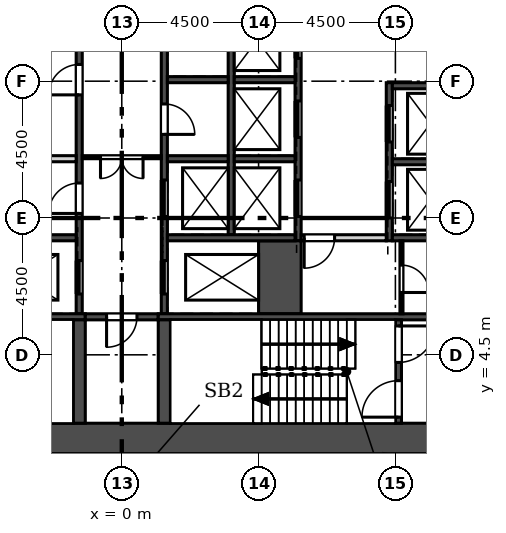
"""IFC4 building model, lengths in metres.
Left out: names, types, materials, properties, quantities, classifications, styles, units other than length and angle.
Written with IfcOpenShell. Run it as: python <this file> out.ifc"""

import sys

from ifc_helpers import new_model, si_unit, direction, frame, frame_2d, origin, place, context, subcontext, project, spatial, rectangle, extrude, element, fill, save


model = new_model("IFC4")
c1 = context("Model", 3, precision=1e-05, world=origin(), true_north=direction((0.0, 1.0)))
c2 = subcontext(c1, "Body", "Model", "MODEL_VIEW")
j1 = project(units=[si_unit("LENGTHUNIT", "METRE"), si_unit("PLANEANGLEUNIT", "RADIAN")], contexts=[c1])
p1 = place(None, origin())
s1 = spatial("IfcSite", under=j1, at=p1, CompositionType="ELEMENT")
p2 = place(p1, origin())
s2 = spatial("IfcBuilding", under=s1, at=p2, CompositionType="ELEMENT")
p3 = place(p2, frame((0.0, 0.0, 259.5)))
s3 = spatial("IfcBuildingStorey", under=s2, at=p3, CompositionType="ELEMENT", Elevation=259.5)
p4 = place(p3, frame((-13.6, 1.75, 0.0), z_axis=(0.0, 0.0, 1.0), x_axis=(1.0, 0.0, 0.0)))
e1 = element("IfcWall", 1, at=p4, inside=s3, PredefinedType="SHEAR", context=c2, shape_type="SweptSolid", body=[
    extrude(rectangle(XDim=27.2, YDim=1.0, at=frame_2d((13.6, 0.0))), origin(), (0.0, 0.0, 1.0), 7.2),
])
p5 = place(p3, frame((13.167, 10.695, 0.0), z_axis=(0.0, 0.0, 1.0), x_axis=(-0.499995021168, 0.866028278295, 0.0)))
e2 = element("IfcWall", 2, at=p5, inside=s3, PredefinedType="SHEAR", context=c2, shape_type="SweptSolid", body=[
    extrude(rectangle(XDim=8.839, YDim=1.0, at=frame_2d((4.419, 0.0))), origin(), (0.0, 0.0, 1.0), 7.2),
])
p6 = place(p3, frame((26.022, 7.709, 0.0), z_axis=(0.0, 0.0, 1.0), x_axis=(-0.500000891752, 0.866024888931, 0.0)))
e3 = element("IfcWall", 3, at=p6, inside=s3, PredefinedType="SOLIDWALL", context=c2, shape_type="SweptSolid", body=[
    extrude(rectangle(XDim=43.339, YDim=0.34, at=frame_2d((21.669, 0.0))), origin(), (0.0, 0.0, 1.0), 6.8),
])
p7 = place(p6, frame((19.335, 0.0, 0.9)))
e4 = element("IfcOpeningElement", 4, at=p7, cuts=e3, PredefinedType="OPENING", context=c2, shape_type="SweptSolid", body=[
    extrude(rectangle(XDim=1.885, YDim=3.0, at=frame_2d((0.942, 1.5))), frame((0.0, 0.18, 0.0), z_axis=(0.0, -1.0, 0.0), x_axis=(1.0, 0.0, 0.0)), (0.0, 0.0, 1.0), 0.36),
])
p8 = place(p6, frame((34.335, 0.0, 0.9)))
e5 = element("IfcOpeningElement", 5, at=p8, cuts=e3, PredefinedType="OPENING", context=c2, shape_type="SweptSolid", body=[
    extrude(rectangle(XDim=1.885, YDim=3.0, at=frame_2d((0.942, 1.5))), frame((0.0, 0.18, 0.0), z_axis=(0.0, -1.0, 0.0), x_axis=(1.0, 0.0, 0.0)), (0.0, 0.0, 1.0), 0.36),
])
p9 = place(p6, frame((40.335, 0.0, 0.9)))
e6 = element("IfcOpeningElement", 6, at=p9, cuts=e3, PredefinedType="OPENING", context=c2, shape_type="SweptSolid", body=[
    extrude(rectangle(XDim=1.885, YDim=3.0, at=frame_2d((0.942, 1.5))), frame((0.0, 0.18, 0.0), z_axis=(0.0, -1.0, 0.0), x_axis=(1.0, 0.0, 0.0)), (0.0, 0.0, 1.0), 0.36),
])
p10 = place(p3, frame((8.8, 8.25, -0.4), z_axis=(0.0, 0.0, 1.0), x_axis=(0.0, 1.0, 0.0)))
e7 = element("IfcWall", 7, at=p10, inside=s3, PredefinedType="SOLIDWALL", context=c2, shape_type="SweptSolid", body=[
    extrude(rectangle(XDim=5.2, YDim=0.2, at=frame_2d((2.6, 0.0))), origin(), (0.0, 0.0, 1.0), 7.2),
])
p11 = place(p10, frame((0.75, 0.0, 0.4)))
e8 = element("IfcOpeningElement", 8, at=p11, cuts=e7, PredefinedType="OPENING", context=c2, shape_type="SweptSolid", body=[
    extrude(rectangle(XDim=1.2, YDim=2.1, at=frame_2d((0.6, 1.05))), frame((0.0, 0.11, 0.0), z_axis=(0.0, -1.0, 0.0), x_axis=(1.0, 0.0, 0.0)), (0.0, 0.0, 1.0), 0.22),
])
p12 = place(p10, frame((3.25, 0.0, 0.4)))
e9 = element("IfcOpeningElement", 9, at=p12, cuts=e7, PredefinedType="OPENING", context=c2, shape_type="SweptSolid", body=[
    extrude(rectangle(XDim=1.2, YDim=2.1, at=frame_2d((0.6, 1.05))), frame((0.0, 0.11, 0.0), z_axis=(0.0, -1.0, 0.0), x_axis=(1.0, 0.0, 0.0)), (0.0, 0.0, 1.0), 0.22),
])
p13 = place(p3, frame((5.8, 8.25, -0.4), z_axis=(0.0, 0.0, 1.0), x_axis=(0.0, 1.0, 0.0)))
e10 = element("IfcWall", 10, at=p13, inside=s3, PredefinedType="SOLIDWALL", context=c2, shape_type="SweptSolid", body=[
    extrude(rectangle(XDim=8.0, YDim=0.2, at=frame_2d((4.0, 0.0))), origin(), (0.0, 0.0, 1.0), 7.2),
])
p14 = place(p13, frame((0.8, 0.0, 0.4)))
e11 = element("IfcOpeningElement", 11, at=p14, cuts=e10, PredefinedType="OPENING", context=c2, shape_type="SweptSolid", body=[
    extrude(rectangle(XDim=1.2, YDim=2.1, at=frame_2d((0.6, 1.05))), frame((0.0, 0.11, 0.0), z_axis=(0.0, -1.0, 0.0), x_axis=(1.0, 0.0, 0.0)), (0.0, 0.0, 1.0), 0.22),
])
p15 = place(p13, frame((3.4, 0.0, 0.4)))
e12 = element("IfcOpeningElement", 12, at=p15, cuts=e10, PredefinedType="OPENING", context=c2, shape_type="SweptSolid", body=[
    extrude(rectangle(XDim=1.2, YDim=2.1, at=frame_2d((0.6, 1.05))), frame((0.0, 0.11, 0.0), z_axis=(0.0, -1.0, 0.0), x_axis=(1.0, 0.0, 0.0)), (0.0, 0.0, 1.0), 0.22),
])
p16 = place(p13, frame((6.0, 0.0, 0.4)))
e13 = element("IfcOpeningElement", 13, at=p16, cuts=e10, PredefinedType="OPENING", context=c2, shape_type="SweptSolid", body=[
    extrude(rectangle(XDim=1.2, YDim=2.1, at=frame_2d((0.6, 1.05))), frame((0.0, 0.11, 0.0), z_axis=(0.0, -1.0, 0.0), x_axis=(1.0, 0.0, 0.0)), (0.0, 0.0, 1.0), 0.22),
])
p17 = place(p3, frame((3.6, 8.45, -0.4), z_axis=(0.0, 0.0, 1.0), x_axis=(0.0, 1.0, 0.0)))
e14 = element("IfcWall", 14, at=p17, inside=s3, PredefinedType="SOLIDWALL", context=c2, shape_type="SweptSolid", body=[
    extrude(rectangle(XDim=7.8, YDim=0.2, at=frame_2d((3.9, 0.0))), origin(), (0.0, 0.0, 1.0), 7.2),
])
p18 = place(p3, frame((-1.4, 5.85, -0.4), z_axis=(0.0, 0.0, 1.0), x_axis=(0.0, 1.0, 0.0)))
e15 = element("IfcWall", 15, at=p18, inside=s3, PredefinedType="SOLIDWALL", context=c2, shape_type="SweptSolid", body=[
    extrude(rectangle(XDim=11.75, YDim=0.2, at=frame_2d((5.875, 0.0))), origin(), (0.0, 0.0, 1.0), 7.2),
])
p19 = place(p18, frame((0.65, 0.0, 0.4)))
e16 = element("IfcOpeningElement", 16, at=p19, cuts=e15, PredefinedType="OPENING", context=c2, shape_type="SweptSolid", body=[
    extrude(rectangle(XDim=1.1, YDim=2.1, at=frame_2d((0.55, 1.05))), frame((0.0, 0.11, 0.0), z_axis=(0.0, -1.0, 0.0), x_axis=(1.0, 0.0, 0.0)), (0.0, 0.0, 1.0), 0.22),
])
p20 = place(p18, frame((3.3, 0.0, 0.4)))
e17 = element("IfcOpeningElement", 17, at=p20, cuts=e15, PredefinedType="OPENING", context=c2, shape_type="SweptSolid", body=[
    extrude(rectangle(XDim=1.0, YDim=2.1, at=frame_2d((0.5, 1.05))), frame((0.0, 0.11, 0.0), z_axis=(0.0, -1.0, 0.0), x_axis=(1.0, 0.0, 0.0)), (0.0, 0.0, 1.0), 0.22),
])
p21 = place(p18, frame((7.2, 0.0, 0.4)))
e18 = element("IfcOpeningElement", 18, at=p21, cuts=e15, PredefinedType="OPENING", context=c2, shape_type="SweptSolid", body=[
    extrude(rectangle(XDim=1.0, YDim=2.1, at=frame_2d((0.5, 1.05))), frame((0.0, 0.11, 0.0), z_axis=(0.0, -1.0, 0.0), x_axis=(1.0, 0.0, 0.0)), (0.0, 0.0, 1.0), 0.22),
])
p22 = place(p3, frame((1.4, 5.85, -0.4), z_axis=(0.0, 0.0, 1.0), x_axis=(0.0, 1.0, 0.0)))
e19 = element("IfcWall", 19, at=p22, inside=s3, PredefinedType="SOLIDWALL", context=c2, shape_type="SweptSolid", body=[
    extrude(rectangle(XDim=11.75, YDim=0.2, at=frame_2d((5.875, 0.0))), origin(), (0.0, 0.0, 1.0), 7.2),
])
p23 = place(p22, frame((3.2, 0.0, 0.4)))
e20 = element("IfcOpeningElement", 20, at=p23, cuts=e19, PredefinedType="OPENING", context=c2, shape_type="SweptSolid", body=[
    extrude(rectangle(XDim=1.2, YDim=2.1, at=frame_2d((0.6, 1.05))), frame((0.0, 0.11, 0.0), z_axis=(0.0, -1.0, 0.0), x_axis=(1.0, 0.0, 0.0)), (0.0, 0.0, 1.0), 0.22),
])
p24 = place(p22, frame((0.65, 0.0, 0.4)))
e21 = element("IfcOpeningElement", 21, at=p24, cuts=e19, PredefinedType="OPENING", context=c2, shape_type="SweptSolid", body=[
    extrude(rectangle(XDim=1.1, YDim=2.1, at=frame_2d((0.55, 1.05))), frame((0.0, 0.11, 0.0), z_axis=(0.0, -1.0, 0.0), x_axis=(1.0, 0.0, 0.0)), (0.0, 0.0, 1.0), 0.22),
])
p25 = place(p22, frame((5.9, 0.0, 0.4)))
e22 = element("IfcOpeningElement", 22, at=p25, cuts=e19, PredefinedType="OPENING", context=c2, shape_type="SweptSolid", body=[
    extrude(rectangle(XDim=1.0, YDim=2.1, at=frame_2d((0.5, 1.05))), frame((0.0, 0.11, 0.0), z_axis=(0.0, -1.0, 0.0), x_axis=(1.0, 0.0, 0.0)), (0.0, 0.0, 1.0), 0.22),
])
p26 = place(p3, frame((5.2, 5.85, -0.4), z_axis=(0.0, 0.0, 1.0), x_axis=(0.0, 1.0, 0.0)))
e23 = element("IfcWall", 23, at=p26, inside=s3, PredefinedType="SOLIDWALL", context=c2, shape_type="SweptSolid", body=[
    extrude(rectangle(XDim=2.4, YDim=1.4, at=frame_2d((1.2, 0.0))), origin(), (0.0, 0.0, 1.0), 7.2),
])
p27 = place(p3, frame((8.9, 8.35, -0.4), z_axis=(0.0, 0.0, 1.0), x_axis=(1.0, 0.0, 0.0)))
e24 = element("IfcWall", 24, at=p27, inside=s3, PredefinedType="SOLIDWALL", context=c2, shape_type="SweptSolid", body=[
    extrude(rectangle(XDim=2.0, YDim=0.2, at=frame_2d((1.0, 0.0))), origin(), (0.0, 0.0, 1.0), 7.2),
])
for number, where, z_axis, x_axis in (
    (25, (-5.7, 8.35, -0.4), (0.0, 0.0, 1.0), (1.0, 0.0, 0.0)),
    (26, (1.5, 8.35, -0.4), (0.0, 0.0, 1.0), (1.0, 0.0, 0.0)),
):
    element("IfcWall", number, at=place(p3, frame(where, z_axis=z_axis, x_axis=x_axis)), inside=s3, PredefinedType="SOLIDWALL", context=c2, shape_type="SweptSolid", body=[
        extrude(rectangle(XDim=4.2, YDim=0.2, at=frame_2d((2.1, 0.0))), origin(), (0.0, 0.0, 1.0), 7.2),
    ])
p28 = place(p3, frame((-12.6, 5.75, -0.4), z_axis=(0.0, 0.0, 1.0), x_axis=(1.0, 0.0, 0.0)))
e27 = element("IfcWall", 27, at=p28, inside=s3, PredefinedType="SOLIDWALL", context=c2, shape_type="SweptSolid", body=[
    extrude(rectangle(XDim=11.4, YDim=0.2, at=frame_2d((5.7, 0.0))), origin(), (0.0, 0.0, 1.0), 7.2),
])
p29 = place(p3, frame((-1.2, 5.75, -0.4), z_axis=(0.0, 0.0, 1.0), x_axis=(1.0, 0.0, 0.0)))
e28 = element("IfcWall", 28, at=p29, inside=s3, PredefinedType="SOLIDWALL", context=c2, shape_type="SweptSolid", body=[
    extrude(rectangle(XDim=2.4, YDim=0.2, at=frame_2d((1.2, 0.0))), origin(), (0.0, 0.0, 1.0), 7.2),
])
p30 = place(p29, frame((0.7, 0.0, 0.4)))
e29 = element("IfcOpeningElement", 29, at=p30, cuts=e28, PredefinedType="OPENING", context=c2, shape_type="SweptSolid", body=[
    extrude(rectangle(XDim=1.0, YDim=2.1, at=frame_2d((0.5, 1.05))), frame((0.0, 0.11, 0.0), z_axis=(0.0, -1.0, 0.0), x_axis=(1.0, 0.0, 0.0)), (0.0, 0.0, 1.0), 0.22),
])
p31 = place(p3, frame((1.2, 5.75, -0.4), z_axis=(0.0, 0.0, 1.0), x_axis=(1.0, 0.0, 0.0)))
e30 = element("IfcWall", 30, at=p31, inside=s3, PredefinedType="SOLIDWALL", context=c2, shape_type="SweptSolid", body=[
    extrude(rectangle(XDim=11.4, YDim=0.2, at=frame_2d((5.7, 0.0))), origin(), (0.0, 0.0, 1.0), 7.2),
])
p32 = place(p3, frame((9.1, 2.25, -0.4), z_axis=(0.0, 0.0, 1.0), x_axis=(0.0, 1.0, 0.0)))
e31 = element("IfcWall", 31, at=p32, inside=s3, PredefinedType="SOLIDWALL", context=c2, shape_type="SweptSolid", body=[
    extrude(rectangle(XDim=3.4, YDim=0.2, at=frame_2d((1.7, 0.0))), origin(), (0.0, 0.0, 1.0), 7.2),
])
p33 = place(p32, frame((0.2, 0.0, 0.4)))
e32 = element("IfcOpeningElement", 32, at=p33, cuts=e31, PredefinedType="OPENING", context=c2, shape_type="SweptSolid", body=[
    extrude(rectangle(XDim=1.2, YDim=2.1, at=frame_2d((0.6, 1.05))), frame((0.0, 0.11, 0.0), z_axis=(0.0, -1.0, 0.0), x_axis=(1.0, 0.0, 0.0)), (0.0, 0.0, 1.0), 0.22),
])
p34 = place(p32, frame((2.0, 0.0, 0.4)))
e33 = element("IfcOpeningElement", 33, at=p34, cuts=e31, PredefinedType="OPENING", context=c2, shape_type="SweptSolid", body=[
    extrude(rectangle(XDim=1.2, YDim=2.1, at=frame_2d((0.6, 1.05))), frame((0.0, 0.11, 0.0), z_axis=(0.0, -1.0, 0.0), x_axis=(1.0, 0.0, 0.0)), (0.0, 0.0, 1.0), 0.22),
])
for number, where, z_axis, x_axis in (
    (34, (-1.4, 2.25, -0.4), (0.0, 0.0, 1.0), (0.0, 1.0, 0.0)),
    (35, (1.4, 2.25, -0.4), (0.0, 0.0, 1.0), (0.0, 1.0, 0.0)),
):
    element("IfcWall", number, at=place(p3, frame(where, z_axis=z_axis, x_axis=x_axis)), inside=s3, PredefinedType="SOLIDWALL", context=c2, shape_type="SweptSolid", body=[
        extrude(rectangle(XDim=3.4, YDim=0.4, at=frame_2d((1.7, 0.0))), origin(), (0.0, 0.0, 1.0), 7.2),
    ])
p35 = place(p3, frame((-3.5, 10.95, 0.0), z_axis=(0.0, 0.0, 1.0), x_axis=(1.0, 0.0, 0.0)))
e36 = element("IfcWall", 36, at=p35, inside=s3, PredefinedType="SOLIDWALL", context=c2, shape_type="SweptSolid", body=[
    extrude(rectangle(XDim=2.0, YDim=0.2, at=frame_2d((1.0, 0.0))), origin(), (0.0, 0.0, 1.0), 6.8),
])
for number, where, z_axis, x_axis in (
    (37, (8.9, 10.85, -0.4), (0.0, 0.0, 1.0), (1.0, 0.0, 0.0)),
    (38, (8.9, 13.35, -0.4), (0.0, 0.0, 1.0), (1.0, 0.0, 0.0)),
    (39, (3.7, 10.95, -0.4), (0.0, 0.0, 1.0), (1.0, 0.0, 0.0)),
    (40, (3.7, 13.55, -0.4), (0.0, 0.0, 1.0), (1.0, 0.0, 0.0)),
    (41, (1.5, 10.95, -0.4), (0.0, 0.0, 1.0), (1.0, 0.0, 0.0)),
    (42, (1.5, 13.55, -0.4), (0.0, 0.0, 1.0), (1.0, 0.0, 0.0)),
):
    element("IfcWall", number, at=place(p3, frame(where, z_axis=z_axis, x_axis=x_axis)), inside=s3, PredefinedType="SOLIDWALL", context=c2, shape_type="SweptSolid", body=[
        extrude(rectangle(XDim=2.0, YDim=0.2, at=frame_2d((1.0, 0.0))), origin(), (0.0, 0.0, 1.0), 7.2),
    ])
p36 = place(p3, frame((9.2, 5.85, 0.0), z_axis=(0.0, 0.0, 1.0), x_axis=(0.0, 1.0, 0.0)))
e43 = element("IfcWall", 43, at=p36, inside=s3, PredefinedType="PARTITIONING", context=c2, shape_type="SweptSolid", body=[
    extrude(rectangle(XDim=2.4, YDim=0.1, at=frame_2d((1.2, 0.0))), origin(), (0.0, 0.0, 1.0), 6.8),
])
p37 = place(p36, frame((0.7, 0.0, 0.0)))
e44 = element("IfcOpeningElement", 44, at=p37, cuts=e43, PredefinedType="OPENING", context=c2, shape_type="SweptSolid", body=[
    extrude(rectangle(XDim=0.9, YDim=2.1, at=frame_2d((0.45, 1.05))), frame((0.0, 0.06, 0.0), z_axis=(0.0, -1.0, 0.0), x_axis=(1.0, 0.0, 0.0)), (0.0, 0.0, 1.0), 0.12),
])
p38 = place(p3, frame((5.9, 8.35, 0.0), z_axis=(0.0, 0.0, 1.0), x_axis=(1.0, 0.0, 0.0)))
e45 = element("IfcWall", 45, at=p38, inside=s3, PredefinedType="SOLIDWALL", context=c2, shape_type="SweptSolid", body=[
    extrude(rectangle(XDim=2.8, YDim=0.2, at=frame_2d((1.4, 0.0))), origin(), (0.0, 0.0, 1.0), 6.8),
])
p39 = place(p38, frame((0.1, 0.0, 0.0)))
e46 = element("IfcOpeningElement", 46, at=p39, cuts=e45, PredefinedType="OPENING", context=c2, shape_type="SweptSolid", body=[
    extrude(rectangle(XDim=1.0, YDim=2.1, at=frame_2d((0.5, 1.05))), frame((0.0, 0.11, 0.0), z_axis=(0.0, -1.0, 0.0), x_axis=(1.0, 0.0, 0.0)), (0.0, 0.0, 1.0), 0.22),
])
p40 = place(p3, frame((-1.3, 11.0, 0.0), z_axis=(0.0, 0.0, 1.0), x_axis=(1.0, 0.0, 0.0)))
e47 = element("IfcWall", 47, at=p40, inside=s3, PredefinedType="PARTITIONING", context=c2, shape_type="SweptSolid", body=[
    extrude(rectangle(XDim=2.6, YDim=0.1, at=frame_2d((1.3, 0.0))), origin(), (0.0, 0.0, 1.0), 6.8),
])
p41 = place(p40, frame((0.6, 0.0, 0.0)))
e48 = element("IfcOpeningElement", 48, at=p41, cuts=e47, PredefinedType="OPENING", context=c2, shape_type="SweptSolid", body=[
    extrude(rectangle(XDim=1.4, YDim=2.1, at=frame_2d((0.7, 1.05))), frame((0.0, 0.06, 0.0), z_axis=(0.0, -1.0, 0.0), x_axis=(1.0, 0.0, 0.0)), (0.0, 0.0, 1.0), 0.12),
])
p42 = place(p3, frame((7.4, 3.95, 0.0), z_axis=(0.0, 0.0, 1.0), x_axis=(1.0, 0.0, 0.0)))
e49 = element("IfcWall", 49, at=p42, inside=s3, PredefinedType="SOLIDWALL", context=c2, shape_type="SweptSolid", body=[
    extrude(rectangle(XDim=1.6, YDim=0.2, at=frame_2d((0.8, 0.0))), origin(), (0.0, 0.0, 1.0), 6.8),
])
p43 = place(p19, origin())
e50 = element("IfcDoor", 50, at=p43, inside=s3, OperationType="SLIDING_TO_RIGHT", PredefinedType="DOOR", context=c2, shape_type="SweptSolid", body=[
    extrude(rectangle(XDim=1.1, YDim=2.1, at=frame_2d((0.55, 1.05))), frame((0.0, 0.025, 0.0), z_axis=(0.0, -1.0, 0.0), x_axis=(1.0, 0.0, 0.0)), (0.0, 0.0, 1.0), 0.05),
])
fill(e16, e50)
p44 = place(p11, origin())
e51 = element("IfcDoor", 51, at=p44, inside=s3, OperationType="SLIDING_TO_LEFT", PredefinedType="DOOR", context=c2, shape_type="SweptSolid", body=[
    extrude(rectangle(XDim=1.2, YDim=2.1, at=frame_2d((0.6, 1.05))), frame((0.0, 0.025, 0.0), z_axis=(0.0, -1.0, 0.0), x_axis=(1.0, 0.0, 0.0)), (0.0, 0.0, 1.0), 0.05),
])
fill(e8, e51)
p45 = place(p12, origin())
e52 = element("IfcDoor", 52, at=p45, inside=s3, OperationType="SLIDING_TO_LEFT", PredefinedType="DOOR", context=c2, shape_type="SweptSolid", body=[
    extrude(rectangle(XDim=1.2, YDim=2.1, at=frame_2d((0.6, 1.05))), frame((0.0, 0.025, 0.0), z_axis=(0.0, -1.0, 0.0), x_axis=(1.0, 0.0, 0.0)), (0.0, 0.0, 1.0), 0.05),
])
fill(e9, e52)
p46 = place(p14, origin())
e53 = element("IfcDoor", 53, at=p46, inside=s3, OperationType="SLIDING_TO_LEFT", PredefinedType="DOOR", context=c2, shape_type="SweptSolid", body=[
    extrude(rectangle(XDim=1.2, YDim=2.1, at=frame_2d((0.6, 1.05))), frame((0.0, 0.025, 0.0), z_axis=(0.0, -1.0, 0.0), x_axis=(1.0, 0.0, 0.0)), (0.0, 0.0, 1.0), 0.05),
])
fill(e11, e53)
p47 = place(p15, origin())
e54 = element("IfcDoor", 54, at=p47, inside=s3, OperationType="SLIDING_TO_LEFT", PredefinedType="DOOR", context=c2, shape_type="SweptSolid", body=[
    extrude(rectangle(XDim=1.2, YDim=2.1, at=frame_2d((0.6, 1.05))), frame((0.0, 0.025, 0.0), z_axis=(0.0, -1.0, 0.0), x_axis=(1.0, 0.0, 0.0)), (0.0, 0.0, 1.0), 0.05),
])
fill(e12, e54)
p48 = place(p16, origin())
e55 = element("IfcDoor", 55, at=p48, inside=s3, OperationType="SLIDING_TO_LEFT", PredefinedType="DOOR", context=c2, shape_type="SweptSolid", body=[
    extrude(rectangle(XDim=1.2, YDim=2.1, at=frame_2d((0.6, 1.05))), frame((0.0, 0.025, 0.0), z_axis=(0.0, -1.0, 0.0), x_axis=(1.0, 0.0, 0.0)), (0.0, 0.0, 1.0), 0.05),
])
fill(e13, e55)
p49 = place(p23, origin())
e56 = element("IfcDoor", 56, at=p49, inside=s3, OperationType="SLIDING_TO_LEFT", PredefinedType="DOOR", context=c2, shape_type="SweptSolid", body=[
    extrude(rectangle(XDim=1.2, YDim=2.1, at=frame_2d((0.6, 1.05))), frame((0.0, 0.025, 0.0), z_axis=(0.0, -1.0, 0.0), x_axis=(1.0, 0.0, 0.0)), (0.0, 0.0, 1.0), 0.05),
])
fill(e20, e56)
p50 = place(p24, origin())
e57 = element("IfcDoor", 57, at=p50, inside=s3, OperationType="SLIDING_TO_RIGHT", PredefinedType="DOOR", context=c2, shape_type="SweptSolid", body=[
    extrude(rectangle(XDim=1.1, YDim=2.1, at=frame_2d((0.55, 1.05))), frame((0.0, 0.025, 0.0), z_axis=(0.0, -1.0, 0.0), x_axis=(1.0, 0.0, 0.0)), (0.0, 0.0, 1.0), 0.05),
])
fill(e21, e57)
p51 = place(p20, origin())
e58 = element("IfcDoor", 58, at=p51, inside=s3, OperationType="SINGLE_SWING_LEFT", PredefinedType="DOOR", context=c2, shape_type="SweptSolid", body=[
    extrude(rectangle(XDim=1.0, YDim=2.1, at=frame_2d((0.5, 1.05))), frame((0.0, 0.025, 0.0), z_axis=(0.0, -1.0, 0.0), x_axis=(1.0, 0.0, 0.0)), (0.0, 0.0, 1.0), 0.05),
])
fill(e17, e58)
p52 = place(p21, origin())
e59 = element("IfcDoor", 59, at=p52, inside=s3, OperationType="SINGLE_SWING_LEFT", PredefinedType="DOOR", context=c2, shape_type="SweptSolid", body=[
    extrude(rectangle(XDim=1.0, YDim=2.1, at=frame_2d((0.5, 1.05))), frame((0.0, 0.025, 0.0), z_axis=(0.0, -1.0, 0.0), x_axis=(1.0, 0.0, 0.0)), (0.0, 0.0, 1.0), 0.05),
])
fill(e18, e59)
p53 = place(p25, frame((1.0, 0.0, 0.0), z_axis=(0.0, 0.0, 1.0), x_axis=(-1.0, 0.0, 0.0)))
e60 = element("IfcDoor", 60, at=p53, inside=s3, OperationType="SINGLE_SWING_RIGHT", PredefinedType="DOOR", context=c2, shape_type="SweptSolid", body=[
    extrude(rectangle(XDim=1.0, YDim=2.1, at=frame_2d((0.5, 1.05))), frame((0.0, 0.025, 0.0), z_axis=(0.0, -1.0, 0.0), x_axis=(1.0, 0.0, 0.0)), (0.0, 0.0, 1.0), 0.05),
])
fill(e22, e60)
p54 = place(p30, frame((1.0, 0.0, 0.0), z_axis=(0.0, 0.0, 1.0), x_axis=(-1.0, 0.0, 0.0)))
e61 = element("IfcDoor", 61, at=p54, inside=s3, OperationType="SINGLE_SWING_RIGHT", PredefinedType="DOOR", context=c2, shape_type="SweptSolid", body=[
    extrude(rectangle(XDim=1.0, YDim=2.1, at=frame_2d((0.5, 1.05))), frame((0.0, 0.025, 0.0), z_axis=(0.0, -1.0, 0.0), x_axis=(1.0, 0.0, 0.0)), (0.0, 0.0, 1.0), 0.05),
])
fill(e29, e61)
p55 = place(p39, frame((1.0, 0.0, 0.0), z_axis=(0.0, 0.0, 1.0), x_axis=(-1.0, 0.0, 0.0)))
e62 = element("IfcDoor", 62, at=p55, inside=s3, OperationType="SINGLE_SWING_RIGHT", PredefinedType="DOOR", context=c2, shape_type="SweptSolid", body=[
    extrude(rectangle(XDim=1.0, YDim=2.1, at=frame_2d((0.5, 1.05))), frame((0.0, 0.025, 0.0), z_axis=(0.0, -1.0, 0.0), x_axis=(1.0, 0.0, 0.0)), (0.0, 0.0, 1.0), 0.05),
])
fill(e46, e62)
p56 = place(p37, frame((0.9, 0.0, 0.0), z_axis=(0.0, 0.0, 1.0), x_axis=(-1.0, 0.0, 0.0)))
e63 = element("IfcDoor", 63, at=p56, inside=s3, OperationType="SINGLE_SWING_RIGHT", PredefinedType="DOOR", context=c2, shape_type="SweptSolid", body=[
    extrude(rectangle(XDim=0.9, YDim=2.1, at=frame_2d((0.45, 1.05))), frame((0.0, 0.025, 0.0), z_axis=(0.0, -1.0, 0.0), x_axis=(1.0, 0.0, 0.0)), (0.0, 0.0, 1.0), 0.05),
])
fill(e44, e63)
p57 = place(p33, origin())
e64 = element("IfcDoor", 64, at=p57, inside=s3, OperationType="SINGLE_SWING_LEFT", PredefinedType="DOOR", context=c2, shape_type="SweptSolid", body=[
    extrude(rectangle(XDim=1.2, YDim=2.1, at=frame_2d((0.6, 1.05))), frame((0.0, 0.025, 0.0), z_axis=(0.0, -1.0, 0.0), x_axis=(1.0, 0.0, 0.0)), (0.0, 0.0, 1.0), 0.05),
])
fill(e32, e64)
p58 = place(p41, frame((1.4, 0.0, 0.0), z_axis=(0.0, 0.0, 1.0), x_axis=(-1.0, 0.0, 0.0)))
e65 = element("IfcDoor", 65, at=p58, inside=s3, OperationType="DOUBLE_DOOR_SINGLE_SWING", PredefinedType="DOOR", context=c2, shape_type="SweptSolid", body=[
    extrude(rectangle(XDim=1.4, YDim=2.1, at=frame_2d((0.7, 1.05))), frame((0.0, 0.025, 0.0), z_axis=(0.0, -1.0, 0.0), x_axis=(1.0, 0.0, 0.0)), (0.0, 0.0, 1.0), 0.05),
])
fill(e48, e65)
p59 = place(p34, frame((1.2, 0.0, 0.0), z_axis=(0.0, 0.0, 1.0), x_axis=(-1.0, 0.0, 0.0)))
e66 = element("IfcDoor", 66, at=p59, inside=s3, OperationType="SINGLE_SWING_LEFT", PredefinedType="DOOR", context=c2, shape_type="SweptSolid", body=[
    extrude(rectangle(XDim=1.2, YDim=2.1, at=frame_2d((0.6, 1.05))), frame((0.0, 0.025, 0.0), z_axis=(0.0, -1.0, 0.0), x_axis=(1.0, 0.0, 0.0)), (0.0, 0.0, 1.0), 0.05),
])
fill(e33, e66)
save(model, sys.argv[1])
